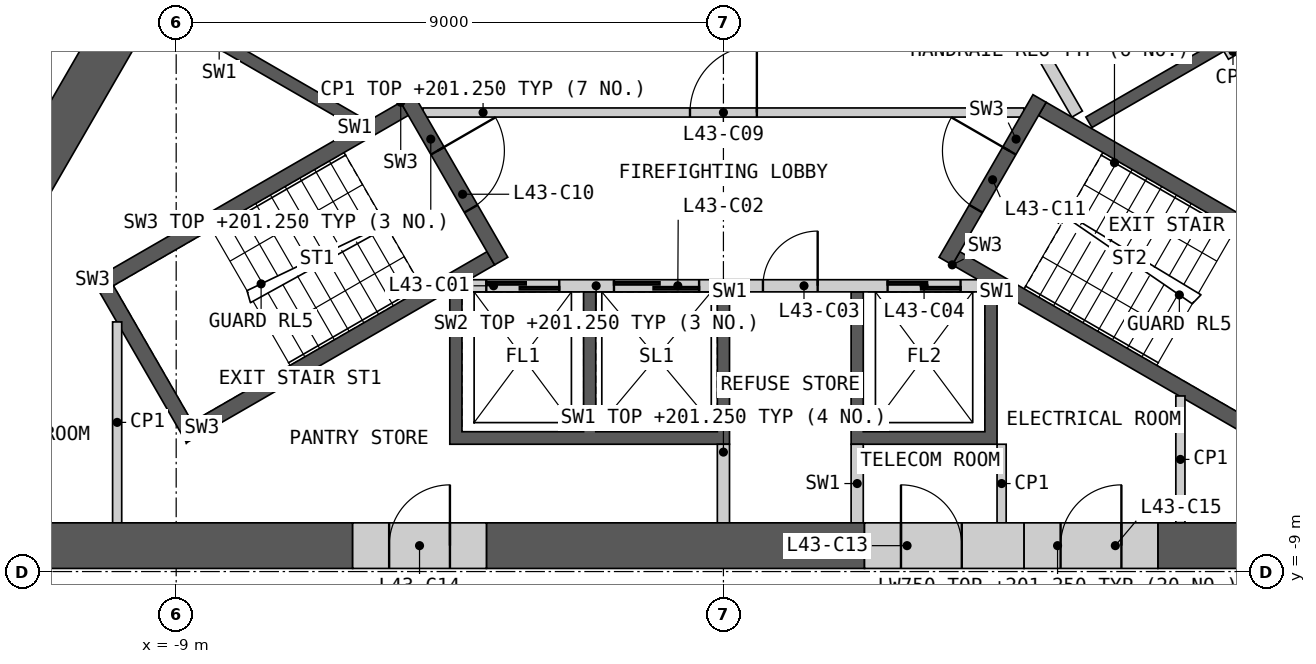
"""IFC4 building model, lengths in metres.
Left out: names, types, materials, properties, quantities, classifications, styles, units other than length and angle.
Written with IfcOpenShell. Run it as: python <this file> out.ifc"""

import sys

from ifc_helpers import new_model, si_unit, direction, frame, frame_2d, origin, place, context, subcontext, project, spatial, polyline, rectangle, outline, extrude, element, fill, save


model = new_model("IFC4")
c1 = context("Model", 3, precision=1e-05, world=origin(), true_north=direction((0.0, 1.0)))
c2 = subcontext(c1, "Body", "Model", "MODEL_VIEW")
j1 = project(units=[si_unit("LENGTHUNIT", "METRE"), si_unit("PLANEANGLEUNIT", "RADIAN")], contexts=[c1])
p1 = place(None, origin())
s1 = spatial("IfcSite", under=j1, at=p1, CompositionType="ELEMENT")
p2 = place(p1, origin())
s2 = spatial("IfcBuilding", under=s1, at=p2, CompositionType="ELEMENT")
p3 = place(p2, frame((0.0, 0.0, 198.0)))
s3 = spatial("IfcBuildingStorey", under=s2, at=p3, CompositionType="ELEMENT", Elevation=198.0)
p4 = place(p3, origin())
e1 = element("IfcWall", 1, at=p4, inside=s3, PredefinedType="SHEAR", context=c2, shape_type="SweptSolid", body=[
    extrude(outline(polyline([(4.5, -4.4), (4.5, -6.906), (2.1, -6.906), (2.1, -4.4), (2.3, -4.4), (2.3, -6.7), (4.3, -6.7), (4.3, -4.4), (4.5, -4.4)])), origin(), (0.0, 0.0, 1.0), 3.25),
])
p5 = place(p3, origin())
e2 = element("IfcWall", 2, at=p5, inside=s3, PredefinedType="SHEAR", context=c2, shape_type="SweptSolid", body=[
    extrude(outline(polyline([(0.1, -4.4), (0.1, -6.906), (-4.5, -6.906), (-4.5, -4.4), (-4.3, -4.4), (-4.3, -6.7), (-2.3, -6.7), (-2.3, -4.4), (-2.1, -4.4), (-2.1, -6.7), (-0.1, -6.7), (-0.1, -4.4), (0.1, -4.4)])), origin(), (0.0, 0.0, 1.0), 3.25),
])
p6 = place(p3, frame((-4.187, -4.3, 0.0), z_axis=(0.0, 0.0, 1.0), x_axis=(1.0, 0.0, 0.0)))
e3 = element("IfcWall", 3, at=p6, inside=s3, PredefinedType="SOLIDWALL", context=c2, shape_type="SweptSolid", body=[
    extrude(rectangle(XDim=8.373, YDim=0.2, at=frame_2d((4.187, 0.0))), origin(), (0.0, 0.0, 1.0), 3.25),
])
p7 = place(p6, frame((0.287, 0.0, 0.0)))
e4 = element("IfcOpeningElement", 4, at=p7, cuts=e3, PredefinedType="OPENING", context=c2, shape_type="SweptSolid", body=[
    extrude(rectangle(XDim=1.2, YDim=2.1, at=frame_2d((0.6, 1.05))), frame((0.0, 0.11, 0.0), z_axis=(0.0, -1.0, 0.0), x_axis=(1.0, 0.0, 0.0)), (0.0, 0.0, 1.0), 0.22),
])
p8 = place(p6, frame((2.387, 0.0, 0.0)))
e5 = element("IfcOpeningElement", 5, at=p8, cuts=e3, PredefinedType="OPENING", context=c2, shape_type="SweptSolid", body=[
    extrude(rectangle(XDim=1.4, YDim=2.1, at=frame_2d((0.7, 1.05))), frame((0.0, 0.11, 0.0), z_axis=(0.0, -1.0, 0.0), x_axis=(1.0, 0.0, 0.0)), (0.0, 0.0, 1.0), 0.22),
])
p9 = place(p6, frame((4.837, 0.0, 0.0)))
e6 = element("IfcOpeningElement", 6, at=p9, cuts=e3, PredefinedType="OPENING", context=c2, shape_type="SweptSolid", body=[
    extrude(rectangle(XDim=0.9, YDim=2.1, at=frame_2d((0.45, 1.05))), frame((0.0, 0.11, 0.0), z_axis=(0.0, -1.0, 0.0), x_axis=(1.0, 0.0, 0.0)), (0.0, 0.0, 1.0), 0.22),
])
p10 = place(p6, frame((6.887, 0.0, 0.0)))
e7 = element("IfcOpeningElement", 7, at=p10, cuts=e3, PredefinedType="OPENING", context=c2, shape_type="SweptSolid", body=[
    extrude(rectangle(XDim=1.2, YDim=2.1, at=frame_2d((0.6, 1.05))), frame((0.0, 0.11, 0.0), z_axis=(0.0, -1.0, 0.0), x_axis=(1.0, 0.0, 0.0)), (0.0, 0.0, 1.0), 0.22),
])
for number, where, z_axis, x_axis in (
    (8, (0.0, -6.906, 0.0), (0.0, 0.0, 1.0), (0.0, -1.0, 0.0)),
    (9, (2.2, -6.906, 0.0), (0.0, 0.0, 1.0), (0.0, -1.0, 0.0)),
):
    element("IfcWall", number, at=place(p3, frame(where, z_axis=z_axis, x_axis=x_axis)), inside=s3, PredefinedType="SHEAR", context=c2, shape_type="SweptSolid", body=[
        extrude(rectangle(XDim=1.293, YDim=0.2, at=frame_2d((0.646, 0.0))), origin(), (0.0, 0.0, 1.0), 3.25),
    ])
p11 = place(p3, origin())
e10 = element("IfcWall", 10, at=p11, inside=s3, PredefinedType="SHEAR", context=c2, shape_type="SweptSolid", body=[
    extrude(outline(polyline([(1.561, 6.097), (3.731, 7.35), (8.231, -0.444), (6.061, -1.697), (5.96, -1.524), (7.952, -0.374), (4.752, 5.169), (2.76, 4.019), (2.66, 4.192), (4.652, 5.342), (3.652, 7.074), (1.66, 5.924), (1.561, 6.097)])), origin(), (0.0, 0.0, 1.0), 3.25),
])
p12 = place(p3, frame((5.817, -1.476, 0.0), z_axis=(0.0, 0.0, 1.0), x_axis=(-0.500002616675, 0.866023893041, 0.0)))
e11 = element("IfcWall", 11, at=p12, inside=s3, PredefinedType="SOLIDWALL", context=c2, shape_type="SweptSolid", body=[
    extrude(rectangle(XDim=8.373, YDim=0.2, at=frame_2d((4.187, 0.0))), origin(), (0.0, 0.0, 1.0), 3.25),
])
p13 = place(p12, frame((2.637, 0.0, 0.0)))
e12 = element("IfcOpeningElement", 12, at=p13, cuts=e11, PredefinedType="OPENING", context=c2, shape_type="SweptSolid", body=[
    extrude(rectangle(XDim=0.9, YDim=2.1, at=frame_2d((0.45, 1.05))), frame((0.0, 0.11, 0.0), z_axis=(0.0, -1.0, 0.0), x_axis=(1.0, 0.0, 0.0)), (0.0, 0.0, 1.0), 0.22),
])
p14 = place(p12, frame((6.937, 0.0, 0.0)))
e13 = element("IfcOpeningElement", 13, at=p14, cuts=e11, PredefinedType="OPENING", context=c2, shape_type="SweptSolid", body=[
    extrude(rectangle(XDim=1.1, YDim=2.1, at=frame_2d((0.55, 1.05))), frame((0.0, 0.11, 0.0), z_axis=(0.0, -1.0, 0.0), x_axis=(1.0, 0.0, 0.0)), (0.0, 0.0, 1.0), 0.22),
])
p15 = place(p3, origin())
e14 = element("IfcWall", 14, at=p15, inside=s3, PredefinedType="SHEAR", context=c2, shape_type="SweptSolid", body=[
    extrude(outline(polyline([(-6.061, -1.697), (-8.231, -0.444), (-8.131, -0.271), (-5.96, -1.524), (-6.061, -1.697)])), origin(), (0.0, 0.0, 1.0), 3.25),
])
p16 = place(p3, frame((-4.941, -1.45, 0.0), z_axis=(0.0, 0.0, 1.0), x_axis=(1.0, 0.0, 0.0)))
e15 = element("IfcWall", 15, at=p16, inside=s3, PredefinedType="PARTITIONING", context=c2, shape_type="SweptSolid", body=[
    extrude(rectangle(XDim=9.882, YDim=0.15, at=frame_2d((4.941, 0.0))), origin(), (0.0, 0.0, 1.0), 3.25),
])
p17 = place(p16, frame((4.391, 0.0, 0.0)))
e16 = element("IfcOpeningElement", 16, at=p17, cuts=e15, PredefinedType="OPENING", context=c2, shape_type="SweptSolid", body=[
    extrude(rectangle(XDim=1.1, YDim=2.1, at=frame_2d((0.55, 1.05))), frame((0.0, 0.085, 0.0), z_axis=(0.0, -1.0, 0.0), x_axis=(1.0, 0.0, 0.0)), (0.0, 0.0, 1.0), 0.17),
])
p18 = place(p3, origin())
e17 = element("IfcWall", 17, at=p18, inside=s3, PredefinedType="SHEAR", context=c2, shape_type="SweptSolid", body=[
    extrude(outline(polyline([(-5.307, -1.281), (-10.374, -4.206), (-10.032, -4.298), (-5.182, -1.498), (-5.307, -1.281)])), origin(), (0.0, 0.0, 1.0), 3.25),
])
p19 = place(p3, origin())
e18 = element("IfcWall", 18, at=p19, inside=s3, PredefinedType="SHEAR", context=c2, shape_type="SweptSolid", body=[
    extrude(outline(polyline([(-10.374, -4.206), (-8.83, -6.881), (-8.738, -6.539), (-10.032, -4.298), (-10.374, -4.206)])), origin(), (0.0, 0.0, 1.0), 3.25),
])
p20 = place(p3, origin())
e19 = element("IfcWall", 19, at=p20, inside=s3, PredefinedType="SHEAR", context=c2, shape_type="SweptSolid", body=[
    extrude(outline(polyline([(-8.738, -6.539), (-8.83, -6.881), (-3.763, -3.956), (-3.888, -3.739), (-8.738, -6.539)])), origin(), (0.0, 0.0, 1.0), 3.25),
])
p21 = place(p3, frame((-5.199, -1.219, 0.0), z_axis=(0.0, 0.0, 1.0), x_axis=(0.499982516597, -0.866035497597, 0.0)))
e20 = element("IfcWall", 20, at=p21, inside=s3, PredefinedType="SHEAR", context=c2, shape_type="SweptSolid", body=[
    extrude(rectangle(XDim=3.088, YDim=0.25, at=frame_2d((1.544, 0.0))), origin(), (0.0, 0.0, 1.0), 3.25),
])
p22 = place(p21, frame((0.994, 0.0, 0.0)))
e21 = element("IfcOpeningElement", 21, at=p22, cuts=e20, PredefinedType="OPENING", context=c2, shape_type="SweptSolid", body=[
    extrude(rectangle(XDim=1.1, YDim=2.1, at=frame_2d((0.55, 1.05))), frame((0.0, 0.135, 0.0), z_axis=(0.0, -1.0, 0.0), x_axis=(1.0, 0.0, 0.0)), (0.0, 0.0, 1.0), 0.27),
])
p23 = place(p3, origin())
e22 = element("IfcWall", 22, at=p23, inside=s3, PredefinedType="SHEAR", context=c2, shape_type="SweptSolid", body=[
    extrude(outline(polyline([(3.763, -3.956), (8.83, -6.881), (8.738, -6.539), (3.888, -3.739), (3.763, -3.956)])), origin(), (0.0, 0.0, 1.0), 3.25),
])
p24 = place(p3, origin())
e23 = element("IfcWall", 23, at=p24, inside=s3, PredefinedType="SHEAR", context=c2, shape_type="SweptSolid", body=[
    extrude(outline(polyline([(10.032, -4.298), (10.374, -4.206), (5.307, -1.281), (5.182, -1.498), (10.032, -4.298)])), origin(), (0.0, 0.0, 1.0), 3.25),
])
p25 = place(p3, frame((3.655, -3.893, 0.0), z_axis=(0.0, 0.0, 1.0), x_axis=(0.499982516597, 0.866035497597, 0.0)))
e24 = element("IfcWall", 24, at=p25, inside=s3, PredefinedType="SHEAR", context=c2, shape_type="SweptSolid", body=[
    extrude(rectangle(XDim=3.088, YDim=0.25, at=frame_2d((1.544, 0.0))), origin(), (0.0, 0.0, 1.0), 3.25),
])
p26 = place(p25, frame((0.994, 0.0, 0.0)))
e25 = element("IfcOpeningElement", 25, at=p26, cuts=e24, PredefinedType="OPENING", context=c2, shape_type="SweptSolid", body=[
    extrude(rectangle(XDim=1.1, YDim=2.1, at=frame_2d((0.55, 1.05))), frame((0.0, 0.135, 0.0), z_axis=(0.0, -1.0, 0.0), x_axis=(1.0, 0.0, 0.0)), (0.0, 0.0, 1.0), 0.27),
])
for number, where, z_axis, x_axis in (
    (26, (8.268, -0.509, 0.0), (0.0, 0.0, 1.0), (0.866, 0.5, 0.0)),
    (27, (4.575, -6.906, 0.0), (0.0, 0.0, 1.0), (0.0, -1.0, 0.0)),
):
    element("IfcWall", number, at=place(p3, frame(where, z_axis=z_axis, x_axis=x_axis)), inside=s3, PredefinedType="PARTITIONING", context=c2, shape_type="SweptSolid", body=[
        extrude(rectangle(XDim=1.293, YDim=0.15, at=frame_2d((0.646, 0.0))), origin(), (0.0, 0.0, 1.0), 3.25),
    ])
p27 = place(p3, frame((-9.971, -8.199, 0.0), z_axis=(0.0, 0.0, 1.0), x_axis=(0.0, 1.0, 0.0)))
e28 = element("IfcWall", 28, at=p27, inside=s3, PredefinedType="PARTITIONING", context=c2, shape_type="SweptSolid", body=[
    extrude(rectangle(XDim=3.305, YDim=0.15, at=frame_2d((1.652, 0.0))), origin(), (0.0, 0.0, 1.0), 3.25),
])
p28 = place(p3, frame((7.515, -8.199, 0.0), z_axis=(0.0, 0.0, 1.0), x_axis=(0.0, 1.0, 0.0)))
e29 = element("IfcWall", 29, at=p28, inside=s3, PredefinedType="PARTITIONING", context=c2, shape_type="SweptSolid", body=[
    extrude(rectangle(XDim=2.087, YDim=0.15, at=frame_2d((1.043, 0.0))), origin(), (0.0, 0.0, 1.0), 3.25),
])
p29 = place(p3, frame((-14.201, -8.574, 0.0), z_axis=(0.0, 0.0, 1.0), x_axis=(1.0, 0.0, 0.0)))
e30 = element("IfcWall", 30, at=p29, inside=s3, PredefinedType="SHEAR", context=c2, shape_type="SweptSolid", body=[
    extrude(rectangle(XDim=8.103, YDim=0.75, at=frame_2d((4.052, 0.0))), origin(), (0.0, 0.0, 1.0), 3.25),
])
p30 = place(p3, frame((-3.898, -8.574, 0.0), z_axis=(0.0, 0.0, 1.0), x_axis=(1.0, 0.0, 0.0)))
e31 = element("IfcWall", 31, at=p30, inside=s3, PredefinedType="SHEAR", context=c2, shape_type="SweptSolid", body=[
    extrude(rectangle(XDim=6.218, YDim=0.75, at=frame_2d((3.109, 0.0))), origin(), (0.0, 0.0, 1.0), 3.25),
])
p31 = place(p3, frame((7.145, -8.574, 0.0), z_axis=(0.0, 0.0, 1.0), x_axis=(1.0, 0.0, 0.0)))
e32 = element("IfcWall", 32, at=p31, inside=s3, PredefinedType="SHEAR", context=c2, shape_type="SweptSolid", body=[
    extrude(rectangle(XDim=2.651, YDim=0.75, at=frame_2d((1.325, 0.0))), origin(), (0.0, 0.0, 1.0), 3.25),
])
p32 = place(p3, frame((-9.625, 0.477, 0.0), z_axis=(0.0, 0.0, 1.0), x_axis=(-0.499951145694, -0.866053607994, 0.0)))
e33 = element("IfcWall", 33, at=p32, inside=s3, PredefinedType="SHEAR", context=c2, shape_type="SweptSolid", body=[
    extrude(rectangle(XDim=3.851, YDim=0.75, at=frame_2d((1.925, 0.0))), origin(), (0.0, 0.0, 1.0), 3.25),
])
p33 = place(p3, frame((2.32, -8.574, 0.0), z_axis=(0.0, 0.0, 1.0), x_axis=(1.0, 0.0, 0.0)))
e34 = element("IfcWall", 34, at=p33, inside=s3, PredefinedType="SHEAR", context=c2, shape_type="SweptSolid", body=[
    extrude(rectangle(XDim=2.625, YDim=0.75, at=frame_2d((1.312, 0.0))), origin(), (0.0, 0.0, 1.0), 3.25),
])
p34 = place(p33, frame((0.6, 0.0, 0.0)))
e35 = element("IfcOpeningElement", 35, at=p34, cuts=e34, PredefinedType="OPENING", context=c2, shape_type="SweptSolid", body=[
    extrude(rectangle(XDim=1.0, YDim=2.1, at=frame_2d((0.5, 1.05))), frame((0.0, 0.385, 0.0), z_axis=(0.0, -1.0, 0.0), x_axis=(1.0, 0.0, 0.0)), (0.0, 0.0, 1.0), 0.77),
])
p35 = place(p3, frame((-6.098, -8.574, 0.0), z_axis=(0.0, 0.0, 1.0), x_axis=(1.0, 0.0, 0.0)))
e36 = element("IfcWall", 36, at=p35, inside=s3, PredefinedType="SHEAR", context=c2, shape_type="SweptSolid", body=[
    extrude(rectangle(XDim=2.2, YDim=0.75, at=frame_2d((1.1, 0.0))), origin(), (0.0, 0.0, 1.0), 3.25),
])
p36 = place(p35, frame((0.6, 0.0, 0.0)))
e37 = element("IfcOpeningElement", 37, at=p36, cuts=e36, PredefinedType="OPENING", context=c2, shape_type="SweptSolid", body=[
    extrude(rectangle(XDim=1.0, YDim=2.1, at=frame_2d((0.5, 1.05))), frame((0.0, 0.385, 0.0), z_axis=(0.0, -1.0, 0.0), x_axis=(1.0, 0.0, 0.0)), (0.0, 0.0, 1.0), 0.77),
])
p37 = place(p3, frame((4.945, -8.574, 0.0), z_axis=(0.0, 0.0, 1.0), x_axis=(1.0, 0.0, 0.0)))
e38 = element("IfcWall", 38, at=p37, inside=s3, PredefinedType="SHEAR", context=c2, shape_type="SweptSolid", body=[
    extrude(rectangle(XDim=2.2, YDim=0.75, at=frame_2d((1.1, 0.0))), origin(), (0.0, 0.0, 1.0), 3.25),
])
p38 = place(p37, frame((0.6, 0.0, 0.0)))
e39 = element("IfcOpeningElement", 39, at=p38, cuts=e38, PredefinedType="OPENING", context=c2, shape_type="SweptSolid", body=[
    extrude(rectangle(XDim=1.0, YDim=2.1, at=frame_2d((0.5, 1.05))), frame((0.0, 0.385, 0.0), z_axis=(0.0, -1.0, 0.0), x_axis=(1.0, 0.0, 0.0)), (0.0, 0.0, 1.0), 0.77),
])
p39 = place(p3, frame((-19.476, -5.035, 0.0), z_axis=(0.0, 0.0, 1.0), x_axis=(0.500000757641, 0.86602496636, 0.0)))
e40 = element("IfcWall", 40, at=p39, inside=s3, PredefinedType="PARTITIONING", context=c2, shape_type="SweptSolid", body=[
    extrude(rectangle(XDim=28.198, YDim=0.2, at=frame_2d((14.099, 0.0))), origin(), (0.0, 0.0, 1.0), 3.25),
])
p40 = place(p39, frame((25.796, 0.0, 0.0)))
e41 = element("IfcOpeningElement", 41, at=p40, cuts=e40, PredefinedType="OPENING", context=c2, shape_type="SweptSolid", body=[
    extrude(rectangle(XDim=0.95, YDim=2.1, at=frame_2d((0.475, 1.05))), frame((0.0, 0.11, 0.0), z_axis=(0.0, -1.0, 0.0), x_axis=(1.0, 0.0, 0.0)), (0.0, 0.0, 1.0), 0.22),
])
p41 = place(p39, frame((14.603, 0.0, 0.0)))
e42 = element("IfcOpeningElement", 42, at=p41, cuts=e40, PredefinedType="OPENING", context=c2, shape_type="SweptSolid", body=[
    extrude(rectangle(XDim=1.1, YDim=2.1, at=frame_2d((0.55, 1.05))), frame((0.0, 0.11, 0.0), z_axis=(0.0, -1.0, 0.0), x_axis=(1.0, 0.0, 0.0)), (0.0, 0.0, 1.0), 0.22),
])
p42 = place(p39, frame((11.993, 0.0, 0.0)))
e43 = element("IfcOpeningElement", 43, at=p42, cuts=e40, PredefinedType="OPENING", context=c2, shape_type="SweptSolid", body=[
    extrude(rectangle(XDim=1.1, YDim=2.1, at=frame_2d((0.55, 1.05))), frame((0.0, 0.11, 0.0), z_axis=(0.0, -1.0, 0.0), x_axis=(1.0, 0.0, 0.0)), (0.0, 0.0, 1.0), 0.22),
])
p43 = place(p39, frame((1.452, 0.0, 0.0)))
e44 = element("IfcOpeningElement", 44, at=p43, cuts=e40, PredefinedType="OPENING", context=c2, shape_type="SweptSolid", body=[
    extrude(rectangle(XDim=0.95, YDim=2.1, at=frame_2d((0.475, 1.05))), frame((0.0, 0.11, 0.0), z_axis=(0.0, -1.0, 0.0), x_axis=(1.0, 0.0, 0.0)), (0.0, 0.0, 1.0), 0.22),
])
p44 = place(p7, origin())
e45 = element("IfcDoor", 45, at=p44, inside=s3, OperationType="SLIDING_TO_LEFT", PredefinedType="DOOR", context=c2, shape_type="SweptSolid", body=[
    extrude(rectangle(XDim=1.2, YDim=2.1, at=frame_2d((0.6, 1.05))), frame((0.0, 0.025, 0.0), z_axis=(0.0, -1.0, 0.0), x_axis=(1.0, 0.0, 0.0)), (0.0, 0.0, 1.0), 0.05),
])
fill(e4, e45)
p45 = place(p8, origin())
e46 = element("IfcDoor", 46, at=p45, inside=s3, OperationType="SLIDING_TO_LEFT", PredefinedType="DOOR", context=c2, shape_type="SweptSolid", body=[
    extrude(rectangle(XDim=1.4, YDim=2.1, at=frame_2d((0.7, 1.05))), frame((0.0, 0.025, 0.0), z_axis=(0.0, -1.0, 0.0), x_axis=(1.0, 0.0, 0.0)), (0.0, 0.0, 1.0), 0.05),
])
fill(e5, e46)
p46 = place(p9, origin())
e47 = element("IfcDoor", 47, at=p46, inside=s3, OperationType="SINGLE_SWING_RIGHT", PredefinedType="DOOR", context=c2, shape_type="SweptSolid", body=[
    extrude(rectangle(XDim=0.9, YDim=2.1, at=frame_2d((0.45, 1.05))), frame((0.0, 0.025, 0.0), z_axis=(0.0, -1.0, 0.0), x_axis=(1.0, 0.0, 0.0)), (0.0, 0.0, 1.0), 0.05),
])
fill(e6, e47)
p47 = place(p10, origin())
e48 = element("IfcDoor", 48, at=p47, inside=s3, OperationType="SLIDING_TO_LEFT", PredefinedType="DOOR", context=c2, shape_type="SweptSolid", body=[
    extrude(rectangle(XDim=1.2, YDim=2.1, at=frame_2d((0.6, 1.05))), frame((0.0, 0.025, 0.0), z_axis=(0.0, -1.0, 0.0), x_axis=(1.0, 0.0, 0.0)), (0.0, 0.0, 1.0), 0.05),
])
fill(e7, e48)
p48 = place(p17, origin())
e49 = element("IfcDoor", 49, at=p48, inside=s3, OperationType="SINGLE_SWING_RIGHT", PredefinedType="DOOR", context=c2, shape_type="SweptSolid", body=[
    extrude(rectangle(XDim=1.1, YDim=2.1, at=frame_2d((0.55, 1.05))), frame((0.0, 0.025, 0.0), z_axis=(0.0, -1.0, 0.0), x_axis=(1.0, 0.0, 0.0)), (0.0, 0.0, 1.0), 0.05),
])
fill(e16, e49)
p49 = place(p22, origin())
e50 = element("IfcDoor", 50, at=p49, inside=s3, OperationType="SINGLE_SWING_LEFT", PredefinedType="DOOR", context=c2, shape_type="SweptSolid", body=[
    extrude(rectangle(XDim=1.1, YDim=2.1, at=frame_2d((0.55, 1.05))), frame((0.0, 0.025, 0.0), z_axis=(0.0, -1.0, 0.0), x_axis=(1.0, 0.0, 0.0)), (0.0, 0.0, 1.0), 0.05),
])
fill(e21, e50)
p50 = place(p26, origin())
e51 = element("IfcDoor", 51, at=p50, inside=s3, OperationType="SINGLE_SWING_RIGHT", PredefinedType="DOOR", context=c2, shape_type="SweptSolid", body=[
    extrude(rectangle(XDim=1.1, YDim=2.1, at=frame_2d((0.55, 1.05))), frame((0.0, 0.025, 0.0), z_axis=(0.0, -1.0, 0.0), x_axis=(1.0, 0.0, 0.0)), (0.0, 0.0, 1.0), 0.05),
])
fill(e25, e51)
p51 = place(p34, origin())
e52 = element("IfcDoor", 52, at=p51, inside=s3, OperationType="SINGLE_SWING_LEFT", PredefinedType="DOOR", context=c2, shape_type="SweptSolid", body=[
    extrude(rectangle(XDim=1.0, YDim=2.1, at=frame_2d((0.5, 1.05))), frame((0.0, 0.13, 0.0), z_axis=(0.0, -1.0, 0.0), x_axis=(1.0, 0.0, 0.0)), (0.0, 0.0, 1.0), 0.05),
])
fill(e35, e52)
p52 = place(p36, origin())
e53 = element("IfcDoor", 53, at=p52, inside=s3, OperationType="SINGLE_SWING_RIGHT", PredefinedType="DOOR", context=c2, shape_type="SweptSolid", body=[
    extrude(rectangle(XDim=1.0, YDim=2.1, at=frame_2d((0.5, 1.05))), frame((0.0, 0.13, 0.0), z_axis=(0.0, -1.0, 0.0), x_axis=(1.0, 0.0, 0.0)), (0.0, 0.0, 1.0), 0.05),
])
fill(e37, e53)
p53 = place(p38, origin())
e54 = element("IfcDoor", 54, at=p53, inside=s3, OperationType="SINGLE_SWING_RIGHT", PredefinedType="DOOR", context=c2, shape_type="SweptSolid", body=[
    extrude(rectangle(XDim=1.0, YDim=2.1, at=frame_2d((0.5, 1.05))), frame((0.0, 0.13, 0.0), z_axis=(0.0, -1.0, 0.0), x_axis=(1.0, 0.0, 0.0)), (0.0, 0.0, 1.0), 0.05),
])
fill(e39, e54)
save(model, sys.argv[1])
